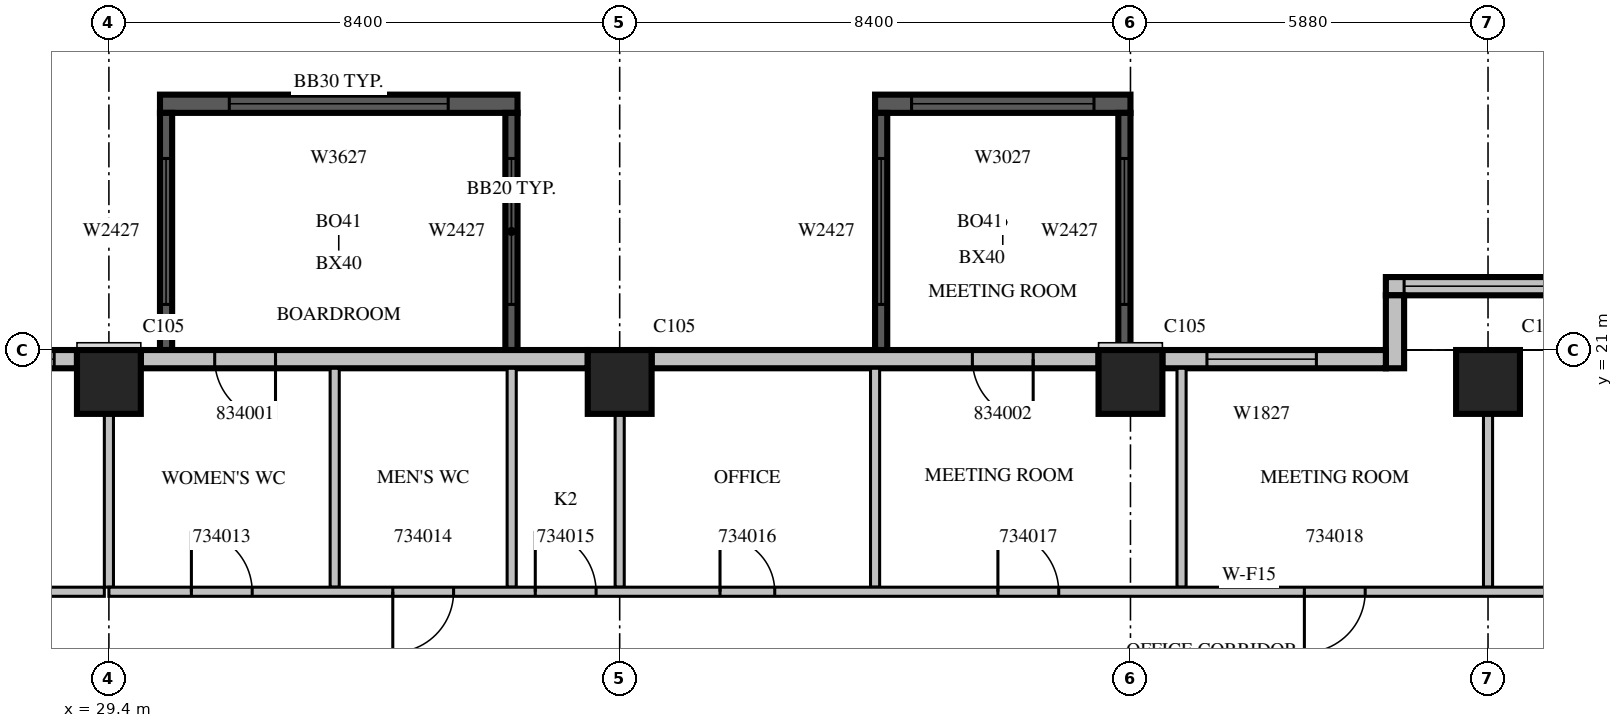
"""IFC4 building model, lengths in metres.
Left out: names, types, materials, properties, quantities, classifications, styles, units other than length and angle.
Written with IfcOpenShell. Run it as: python <this file> out.ifc"""

import sys

from ifc_helpers import new_model, si_unit, direction, frame, frame_2d, origin, origin_2d, place, context, subcontext, project, spatial, rectangle, extrude, source, transform, mapped, element, fill, save


model = new_model("IFC4")
c1 = context("Model", 3, precision=1e-05, world=origin(), true_north=direction((0.0, 1.0)))
c2 = subcontext(c1, "Body", "Model", "MODEL_VIEW")
j1 = project(units=[si_unit("LENGTHUNIT", "METRE"), si_unit("PLANEANGLEUNIT", "RADIAN")], contexts=[c1])
p1 = place(None, origin())
s1 = spatial("IfcSite", under=j1, at=p1, CompositionType="ELEMENT")
p2 = place(p1, origin())
s2 = spatial("IfcBuilding", under=s1, at=p2, CompositionType="ELEMENT")
p3 = place(p2, frame((0.0, 0.0, 153.9)))
s3 = spatial("IfcBuildingStorey", under=s2, at=p3, CompositionType="ELEMENT", Elevation=153.9)
m1 = source(origin(), c2, "Body", "SweptSolid", [
    extrude(rectangle(XDim=1.05, YDim=1.05, at=origin_2d()), origin(), (0.0, 0.0, 1.0), 4.2),
])
for number, where, z_axis, x_axis in (
    (1, (29.4, 20.475, 0.0), (0.0, 0.0, 1.0), (1.0, 0.0, 0.0)),
    (2, (37.8, 20.475, 0.0), (0.0, 0.0, 1.0), (1.0, 0.0, 0.0)),
    (3, (46.2, 20.475, 0.0), (0.0, 0.0, 1.0), (1.0, 0.0, 0.0)),
    (4, (52.08, 20.475, 0.0), (0.0, 0.0, 1.0), (1.0, 0.0, 0.0)),
):
    element("IfcColumn", number, at=place(p3, frame(where, z_axis=z_axis, x_axis=x_axis)), inside=s3, PredefinedType="COLUMN", context=c2, shape_type="MappedRepresentation", body=[
        mapped(m1, transform((0.0, 0.0, 0.0), scale=1.0)),
    ])
m2 = source(origin(), c2, "Body", "SweptSolid", [
    extrude(rectangle(XDim=5.88, YDim=0.3, at=frame_2d((2.94, 0.0))), origin(), (0.0, 0.0, 1.0), 3.8),
])
p4 = place(p3, frame((36.12, 25.05, 0.0), z_axis=(0.0, 0.0, 1.0), x_axis=(-1.0, 0.0, 0.0)))
e5 = element("IfcWall", 5, at=p4, inside=s3, PredefinedType="SOLIDWALL", context=c2, shape_type="MappedRepresentation", body=[
    mapped(m2, transform((0.0, 0.0, 0.0), scale=1.0)),
])
m3 = source(origin(), c2, "Body", "SweptSolid", [
    extrude(rectangle(XDim=3.6, YDim=2.7, at=frame_2d((1.8, 1.35))), frame((0.0, 0.16, 0.0), z_axis=(0.0, -1.0, 0.0), x_axis=(1.0, 0.0, 0.0)), (0.0, 0.0, 1.0), 0.32),
])
p5 = place(p4, frame((1.14, 0.0, 0.6)))
e6 = element("IfcOpeningElement", 6, at=p5, cuts=e5, PredefinedType="OPENING", context=c2, shape_type="MappedRepresentation", body=[
    mapped(m3, transform((0.0, 0.0, 0.0), scale=1.0)),
])
m4 = source(origin(), c2, "Body", "SweptSolid", [
    extrude(rectangle(XDim=3.9, YDim=0.2, at=frame_2d((1.95, 0.0))), origin(), (0.0, 0.0, 1.0), 3.8),
])
p6 = place(p3, frame((36.02, 21.0, 0.0), z_axis=(0.0, 0.0, 1.0), x_axis=(0.0, 1.0, 0.0)))
e7 = element("IfcWall", 7, at=p6, inside=s3, PredefinedType="SOLIDWALL", context=c2, shape_type="MappedRepresentation", body=[
    mapped(m4, transform((0.0, 0.0, 0.0), scale=1.0)),
])
m5 = source(origin(), c2, "Body", "SweptSolid", [
    extrude(rectangle(XDim=2.4, YDim=2.7, at=frame_2d((1.2, 1.35))), frame((0.0, 0.11, 0.0), z_axis=(0.0, -1.0, 0.0), x_axis=(1.0, 0.0, 0.0)), (0.0, 0.0, 1.0), 0.22),
])
p7 = place(p6, frame((0.75, 0.0, 0.6)))
e8 = element("IfcOpeningElement", 8, at=p7, cuts=e7, PredefinedType="OPENING", context=c2, shape_type="MappedRepresentation", body=[
    mapped(m5, transform((0.0, 0.0, 0.0), scale=1.0)),
])
p8 = place(p3, frame((30.34, 21.0, 0.0), z_axis=(0.0, 0.0, 1.0), x_axis=(0.0, 1.0, 0.0)))
e9 = element("IfcWall", 9, at=p8, inside=s3, PredefinedType="SOLIDWALL", context=c2, shape_type="MappedRepresentation", body=[
    mapped(m4, transform((0.0, 0.0, 0.0), scale=1.0)),
])
p9 = place(p8, frame((0.75, 0.0, 0.6)))
e10 = element("IfcOpeningElement", 10, at=p9, cuts=e9, PredefinedType="OPENING", context=c2, shape_type="MappedRepresentation", body=[
    mapped(m5, transform((0.0, 0.0, 0.0), scale=1.0)),
])
m6 = source(origin(), c2, "Body", "SweptSolid", [
    extrude(rectangle(XDim=4.2, YDim=0.3, at=frame_2d((2.1, 0.0))), origin(), (0.0, 0.0, 1.0), 3.8),
])
p10 = place(p3, frame((46.2, 25.05, 0.0), z_axis=(0.0, 0.0, 1.0), x_axis=(-1.0, 0.0, 0.0)))
e11 = element("IfcWall", 11, at=p10, inside=s3, PredefinedType="SOLIDWALL", context=c2, shape_type="MappedRepresentation", body=[
    mapped(m6, transform((0.0, 0.0, 0.0), scale=1.0)),
])
m7 = source(origin(), c2, "Body", "SweptSolid", [
    extrude(rectangle(XDim=3.0, YDim=2.7, at=frame_2d((1.5, 1.35))), frame((0.0, 0.16, 0.0), z_axis=(0.0, -1.0, 0.0), x_axis=(1.0, 0.0, 0.0)), (0.0, 0.0, 1.0), 0.32),
])
p11 = place(p10, frame((0.6, 0.0, 0.6)))
e12 = element("IfcOpeningElement", 12, at=p11, cuts=e11, PredefinedType="OPENING", context=c2, shape_type="MappedRepresentation", body=[
    mapped(m7, transform((0.0, 0.0, 0.0), scale=1.0)),
])
p12 = place(p3, frame((46.1, 21.0, 0.0), z_axis=(0.0, 0.0, 1.0), x_axis=(0.0, 1.0, 0.0)))
e13 = element("IfcWall", 13, at=p12, inside=s3, PredefinedType="SOLIDWALL", context=c2, shape_type="MappedRepresentation", body=[
    mapped(m4, transform((0.0, 0.0, 0.0), scale=1.0)),
])
p13 = place(p12, frame((0.75, 0.0, 0.6)))
e14 = element("IfcOpeningElement", 14, at=p13, cuts=e13, PredefinedType="OPENING", context=c2, shape_type="MappedRepresentation", body=[
    mapped(m5, transform((0.0, 0.0, 0.0), scale=1.0)),
])
p14 = place(p3, frame((42.1, 21.0, 0.0), z_axis=(0.0, 0.0, 1.0), x_axis=(0.0, 1.0, 0.0)))
e15 = element("IfcWall", 15, at=p14, inside=s3, PredefinedType="SOLIDWALL", context=c2, shape_type="MappedRepresentation", body=[
    mapped(m4, transform((0.0, 0.0, 0.0), scale=1.0)),
])
p15 = place(p14, frame((0.75, 0.0, 0.6)))
e16 = element("IfcOpeningElement", 16, at=p15, cuts=e15, PredefinedType="OPENING", context=c2, shape_type="MappedRepresentation", body=[
    mapped(m5, transform((0.0, 0.0, 0.0), scale=1.0)),
])
p16 = place(p3, frame((63.0, 22.05, 0.0), z_axis=(0.0, 0.0, 1.0), x_axis=(-1.0, 0.0, 0.0)))
e17 = element("IfcWall", 17, at=p16, inside=s3, PredefinedType="STANDARD", context=c2, shape_type="SweptSolid", body=[
    extrude(rectangle(XDim=12.6, YDim=0.3, at=frame_2d((6.3, 0.0))), origin(), (0.0, 0.0, 1.0), 3.8),
])
p17 = place(p16, frame((0.3, 0.0, 0.6)))
e18 = element("IfcOpeningElement", 18, at=p17, cuts=e17, PredefinedType="OPENING", context=c2, shape_type="MappedRepresentation", body=[
    mapped(m3, transform((0.0, 0.0, 0.0), scale=1.0)),
])
p18 = place(p16, frame((4.5, 0.0, 0.6)))
e19 = element("IfcOpeningElement", 19, at=p18, cuts=e17, PredefinedType="OPENING", context=c2, shape_type="MappedRepresentation", body=[
    mapped(m3, transform((0.0, 0.0, 0.0), scale=1.0)),
])
p19 = place(p16, frame((8.7, 0.0, 0.6)))
e20 = element("IfcOpeningElement", 20, at=p19, cuts=e17, PredefinedType="OPENING", context=c2, shape_type="MappedRepresentation", body=[
    mapped(m3, transform((0.0, 0.0, 0.0), scale=1.0)),
])
m8 = source(origin(), c2, "Body", "SweptSolid", [
    extrude(rectangle(XDim=1.2, YDim=0.3, at=frame_2d((0.6, 0.0))), origin(), (0.0, 0.0, 1.0), 3.8),
])
p20 = place(p3, frame((50.55, 20.7, 0.0), z_axis=(0.0, 0.0, 1.0), x_axis=(0.0, 1.0, 0.0)))
e21 = element("IfcWall", 21, at=p20, inside=s3, PredefinedType="STANDARD", context=c2, shape_type="MappedRepresentation", body=[
    mapped(m8, transform((0.0, 0.0, 0.0), scale=1.0)),
])
m9 = source(origin(), c2, "Body", "SweptSolid", [
    extrude(rectangle(XDim=3.675, YDim=0.3, at=frame_2d((1.837, 0.0))), origin(), (0.0, 0.0, 1.0), 3.8),
])
p21 = place(p3, frame((50.4, 20.85, 0.0), z_axis=(0.0, 0.0, 1.0), x_axis=(-1.0, 0.0, 0.0)))
e22 = element("IfcWall", 22, at=p21, inside=s3, PredefinedType="STANDARD", context=c2, shape_type="MappedRepresentation", body=[
    mapped(m9, transform((0.0, 0.0, 0.0), scale=1.0)),
])
m10 = source(origin(), c2, "Body", "SweptSolid", [
    extrude(rectangle(XDim=1.8, YDim=2.7, at=frame_2d((0.9, 1.35))), frame((0.0, 0.16, 0.0), z_axis=(0.0, -1.0, 0.0), x_axis=(1.0, 0.0, 0.0)), (0.0, 0.0, 1.0), 0.32),
])
p22 = place(p21, frame((1.143, 0.0, 0.6)))
e23 = element("IfcOpeningElement", 23, at=p22, cuts=e22, PredefinedType="OPENING", context=c2, shape_type="MappedRepresentation", body=[
    mapped(m10, transform((0.0, 0.0, 0.0), scale=1.0)),
])
m11 = source(origin(), c2, "Body", "SweptSolid", [
    extrude(rectangle(XDim=7.35, YDim=0.3, at=frame_2d((3.675, 0.0))), origin(), (0.0, 0.0, 1.0), 3.8),
])
p23 = place(p3, frame((45.675, 20.85, 0.0), z_axis=(0.0, 0.0, 1.0), x_axis=(-1.0, 0.0, 0.0)))
e24 = element("IfcWall", 24, at=p23, inside=s3, PredefinedType="STANDARD", context=c2, shape_type="MappedRepresentation", body=[
    mapped(m11, transform((0.0, 0.0, 0.0), scale=1.0)),
])
m12 = source(origin(), c2, "Body", "SweptSolid", [
    extrude(rectangle(XDim=1.0, YDim=2.1, at=frame_2d((0.5, 1.05))), frame((0.0, 0.16, 0.0), z_axis=(0.0, -1.0, 0.0), x_axis=(1.0, 0.0, 0.0)), (0.0, 0.0, 1.0), 0.32),
])
p24 = place(p23, frame((1.075, 0.0, 0.0)))
e25 = element("IfcOpeningElement", 25, at=p24, cuts=e24, PredefinedType="OPENING", context=c2, shape_type="MappedRepresentation", body=[
    mapped(m12, transform((0.0, 0.0, 0.0), scale=1.0)),
])
p25 = place(p3, frame((37.275, 20.85, 0.0), z_axis=(0.0, 0.0, 1.0), x_axis=(-1.0, 0.0, 0.0)))
e26 = element("IfcWall", 26, at=p25, inside=s3, PredefinedType="STANDARD", context=c2, shape_type="MappedRepresentation", body=[
    mapped(m11, transform((0.0, 0.0, 0.0), scale=1.0)),
])
p26 = place(p25, frame((5.135, 0.0, 0.0)))
e27 = element("IfcOpeningElement", 27, at=p26, cuts=e26, PredefinedType="OPENING", context=c2, shape_type="MappedRepresentation", body=[
    mapped(m12, transform((0.0, 0.0, 0.0), scale=1.0)),
])
m13 = source(origin(), c2, "Body", "SweptSolid", [
    extrude(rectangle(XDim=6.875, YDim=0.3, at=frame_2d((3.438, 0.0))), origin(), (0.0, 0.0, 1.0), 3.8),
])
p27 = place(p3, frame((28.875, 20.85, 0.0), z_axis=(0.0, 0.0, 1.0), x_axis=(-1.0, 0.0, 0.0)))
e28 = element("IfcWall", 28, at=p27, inside=s3, PredefinedType="STANDARD", context=c2, shape_type="MappedRepresentation", body=[
    mapped(m13, transform((0.0, 0.0, 0.0), scale=1.0)),
])
m14 = source(origin(), c2, "Body", "SweptSolid", [
    extrude(rectangle(XDim=2.4, YDim=2.7, at=frame_2d((1.2, 1.35))), frame((0.0, 0.16, 0.0), z_axis=(0.0, -1.0, 0.0), x_axis=(1.0, 0.0, 0.0)), (0.0, 0.0, 1.0), 0.32),
])
p28 = place(p27, frame((0.375, 0.0, 0.6)))
e29 = element("IfcOpeningElement", 29, at=p28, cuts=e28, PredefinedType="OPENING", context=c2, shape_type="MappedRepresentation", body=[
    mapped(m14, transform((0.0, 0.0, 0.0), scale=1.0)),
])
m15 = source(origin(), c2, "Body", "SweptSolid", [
    extrude(rectangle(XDim=5.35, YDim=0.15, at=frame_2d((2.675, 0.0))), origin(), (0.0, 0.0, 1.0), 3.8),
])
p29 = place(p3, frame((23.975, 17.025, 0.0), z_axis=(0.0, 0.0, 1.0), x_axis=(1.0, 0.0, 0.0)))
e30 = element("IfcWall", 30, at=p29, inside=s3, PredefinedType="PARTITIONING", context=c2, shape_type="MappedRepresentation", body=[
    mapped(m15, transform((0.0, 0.0, 0.0), scale=1.0)),
])
m16 = source(origin(), c2, "Body", "SweptSolid", [
    extrude(rectangle(XDim=2.851, YDim=0.15, at=frame_2d((1.425, 0.0))), origin(), (0.0, 0.0, 1.0), 3.8),
])
p30 = place(p3, frame((29.4, 17.1, 0.0), z_axis=(0.0, 0.0, 1.0), x_axis=(0.0, 1.0, 0.0)))
e31 = element("IfcWall", 31, at=p30, inside=s3, PredefinedType="PARTITIONING", context=c2, shape_type="MappedRepresentation", body=[
    mapped(m16, transform((0.0, 0.0, 0.0), scale=1.0)),
])
m17 = source(origin(), c2, "Body", "SweptSolid", [
    extrude(rectangle(XDim=3.6, YDim=0.15, at=frame_2d((1.8, 0.0))), origin(), (0.0, 0.0, 1.0), 3.8),
])
for number, where, z_axis, x_axis in (
    (32, (33.113, 20.7, 0.0), (0.0, 0.0, 1.0), (0.0, -1.0, 0.0)),
    (33, (36.024, 20.7, 0.0), (0.0, 0.0, 1.0), (0.0, -1.0, 0.0)),
    (34, (47.04, 20.7, 0.0), (0.0, 0.0, 1.0), (0.0, -1.0, 0.0)),
):
    element("IfcWall", number, at=place(p3, frame(where, z_axis=z_axis, x_axis=x_axis)), inside=s3, PredefinedType="PARTITIONING", context=c2, shape_type="MappedRepresentation", body=[
        mapped(m17, transform((0.0, 0.0, 0.0), scale=1.0)),
    ])
p31 = place(p3, frame((37.8, 17.1, 0.0), z_axis=(0.0, 0.0, 1.0), x_axis=(0.0, 1.0, 0.0)))
e35 = element("IfcWall", 35, at=p31, inside=s3, PredefinedType="PARTITIONING", context=c2, shape_type="MappedRepresentation", body=[
    mapped(m16, transform((0.0, 0.0, 0.0), scale=1.0)),
])
p32 = place(p3, frame((42.0, 17.1, 0.0), z_axis=(0.0, 0.0, 1.0), x_axis=(0.0, 1.0, 0.0)))
e36 = element("IfcWall", 36, at=p32, inside=s3, PredefinedType="PARTITIONING", context=c2, shape_type="MappedRepresentation", body=[
    mapped(m17, transform((0.0, 0.0, 0.0), scale=1.0)),
])
p33 = place(p3, frame((52.08, 17.1, 0.0), z_axis=(0.0, 0.0, 1.0), x_axis=(0.0, 1.0, 0.0)))
e37 = element("IfcWall", 37, at=p33, inside=s3, PredefinedType="PARTITIONING", context=c2, shape_type="MappedRepresentation", body=[
    mapped(m16, transform((0.0, 0.0, 0.0), scale=1.0)),
])
m18 = source(origin(), c2, "Body", "SweptSolid", [
    extrude(rectangle(XDim=37.5, YDim=0.15, at=frame_2d((18.75, 0.0))), origin(), (0.0, 0.0, 1.0), 3.8),
])
p34 = place(p3, frame((29.4, 17.025, 0.0), z_axis=(0.0, 0.0, 1.0), x_axis=(1.0, 0.0, 0.0)))
e38 = element("IfcWall", 38, at=p34, inside=s3, PredefinedType="PARTITIONING", context=c2, shape_type="MappedRepresentation", body=[
    mapped(m18, transform((0.0, 0.0, 0.0), scale=1.0)),
])
m19 = source(origin(), c2, "Body", "SweptSolid", [
    extrude(rectangle(XDim=1.0, YDim=2.1, at=frame_2d((0.5, 1.05))), frame((0.0, 0.085, 0.0), z_axis=(0.0, -1.0, 0.0), x_axis=(1.0, 0.0, 0.0)), (0.0, 0.0, 1.0), 0.17),
])
p35 = place(p34, frame((1.357, 0.0, 0.0)))
e39 = element("IfcOpeningElement", 39, at=p35, cuts=e38, PredefinedType="OPENING", context=c2, shape_type="MappedRepresentation", body=[
    mapped(m19, transform((0.0, 0.0, 0.0), scale=1.0)),
])
p36 = place(p34, frame((4.669, 0.0, 0.0)))
e40 = element("IfcOpeningElement", 40, at=p36, cuts=e38, PredefinedType="OPENING", context=c2, shape_type="MappedRepresentation", body=[
    mapped(m19, transform((0.0, 0.0, 0.0), scale=1.0)),
])
p37 = place(p34, frame((7.012, 0.0, 0.0)))
e41 = element("IfcOpeningElement", 41, at=p37, cuts=e38, PredefinedType="OPENING", context=c2, shape_type="MappedRepresentation", body=[
    mapped(m19, transform((0.0, 0.0, 0.0), scale=1.0)),
])
m20 = source(origin(), c2, "Body", "SweptSolid", [
    extrude(rectangle(XDim=0.9, YDim=2.1, at=frame_2d((0.45, 1.05))), frame((0.0, 0.085, 0.0), z_axis=(0.0, -1.0, 0.0), x_axis=(1.0, 0.0, 0.0)), (0.0, 0.0, 1.0), 0.17),
])
p38 = place(p34, frame((10.05, 0.0, 0.0)))
e42 = element("IfcOpeningElement", 42, at=p38, cuts=e38, PredefinedType="OPENING", context=c2, shape_type="MappedRepresentation", body=[
    mapped(m20, transform((0.0, 0.0, 0.0), scale=1.0)),
])
p39 = place(p34, frame((14.62, 0.0, 0.0)))
e43 = element("IfcOpeningElement", 43, at=p39, cuts=e38, PredefinedType="OPENING", context=c2, shape_type="MappedRepresentation", body=[
    mapped(m19, transform((0.0, 0.0, 0.0), scale=1.0)),
])
p40 = place(p34, frame((19.66, 0.0, 0.0)))
e44 = element("IfcOpeningElement", 44, at=p40, cuts=e38, PredefinedType="OPENING", context=c2, shape_type="MappedRepresentation", body=[
    mapped(m19, transform((0.0, 0.0, 0.0), scale=1.0)),
])
m21 = source(origin(), c2, "Body", "SweptSolid", [
    extrude(rectangle(XDim=1.2, YDim=2.1, at=frame_2d((0.6, 1.05))), frame((0.0, 0.085, 0.0), z_axis=(0.0, -1.0, 0.0), x_axis=(1.0, 0.0, 0.0)), (0.0, 0.0, 1.0), 0.17),
])
p41 = place(p34, frame((25.804, 0.0, 0.0)))
e45 = element("IfcOpeningElement", 45, at=p41, cuts=e38, PredefinedType="OPENING", context=c2, shape_type="MappedRepresentation", body=[
    mapped(m21, transform((0.0, 0.0, 0.0), scale=1.0)),
])
p42 = place(p34, frame((33.251, 0.0, 0.0)))
e46 = element("IfcOpeningElement", 46, at=p42, cuts=e38, PredefinedType="OPENING", context=c2, shape_type="MappedRepresentation", body=[
    mapped(m21, transform((0.0, 0.0, 0.0), scale=1.0)),
])
m22 = source(origin(), c2, "Body", "SweptSolid", [
    extrude(rectangle(XDim=3.6, YDim=2.7, at=frame_2d((1.8, 1.35))), frame((0.0, 0.03, 0.0), z_axis=(0.0, -1.0, 0.0), x_axis=(1.0, 0.0, 0.0)), (0.0, 0.0, 1.0), 0.06),
])
p43 = place(p5, origin())
e47 = element("IfcWindow", 47, at=p43, inside=s3, PartitioningType="SINGLE_PANEL", PredefinedType="WINDOW", context=c2, shape_type="MappedRepresentation", body=[
    mapped(m22, transform((0.0, 0.0, 0.0), scale=1.0)),
])
fill(e6, e47)
m23 = source(origin(), c2, "Body", "SweptSolid", [
    extrude(rectangle(XDim=2.4, YDim=2.7, at=frame_2d((1.2, 1.35))), frame((0.0, 0.03, 0.0), z_axis=(0.0, -1.0, 0.0), x_axis=(1.0, 0.0, 0.0)), (0.0, 0.0, 1.0), 0.06),
])
p44 = place(p7, origin())
e48 = element("IfcWindow", 48, at=p44, inside=s3, PartitioningType="SINGLE_PANEL", PredefinedType="WINDOW", context=c2, shape_type="MappedRepresentation", body=[
    mapped(m23, transform((0.0, 0.0, 0.0), scale=1.0)),
])
fill(e8, e48)
p45 = place(p9, origin())
e49 = element("IfcWindow", 49, at=p45, inside=s3, PartitioningType="SINGLE_PANEL", PredefinedType="WINDOW", context=c2, shape_type="MappedRepresentation", body=[
    mapped(m23, transform((0.0, 0.0, 0.0), scale=1.0)),
])
fill(e10, e49)
m24 = source(origin(), c2, "Body", "SweptSolid", [
    extrude(rectangle(XDim=3.0, YDim=2.7, at=frame_2d((1.5, 1.35))), frame((0.0, 0.03, 0.0), z_axis=(0.0, -1.0, 0.0), x_axis=(1.0, 0.0, 0.0)), (0.0, 0.0, 1.0), 0.06),
])
p46 = place(p11, origin())
e50 = element("IfcWindow", 50, at=p46, inside=s3, PartitioningType="SINGLE_PANEL", PredefinedType="WINDOW", context=c2, shape_type="MappedRepresentation", body=[
    mapped(m24, transform((0.0, 0.0, 0.0), scale=1.0)),
])
fill(e12, e50)
p47 = place(p13, origin())
e51 = element("IfcWindow", 51, at=p47, inside=s3, PartitioningType="SINGLE_PANEL", PredefinedType="WINDOW", context=c2, shape_type="MappedRepresentation", body=[
    mapped(m23, transform((0.0, 0.0, 0.0), scale=1.0)),
])
fill(e14, e51)
p48 = place(p15, origin())
e52 = element("IfcWindow", 52, at=p48, inside=s3, PartitioningType="SINGLE_PANEL", PredefinedType="WINDOW", context=c2, shape_type="MappedRepresentation", body=[
    mapped(m23, transform((0.0, 0.0, 0.0), scale=1.0)),
])
fill(e16, e52)
p49 = place(p19, origin())
e53 = element("IfcWindow", 53, at=p49, inside=s3, PartitioningType="SINGLE_PANEL", PredefinedType="WINDOW", context=c2, shape_type="MappedRepresentation", body=[
    mapped(m22, transform((0.0, 0.0, 0.0), scale=1.0)),
])
fill(e20, e53)
m25 = source(origin(), c2, "Body", "SweptSolid", [
    extrude(rectangle(XDim=1.8, YDim=2.7, at=frame_2d((0.9, 1.35))), frame((0.0, 0.03, 0.0), z_axis=(0.0, -1.0, 0.0), x_axis=(1.0, 0.0, 0.0)), (0.0, 0.0, 1.0), 0.06),
])
p50 = place(p22, origin())
e54 = element("IfcWindow", 54, at=p50, inside=s3, PartitioningType="SINGLE_PANEL", PredefinedType="WINDOW", context=c2, shape_type="MappedRepresentation", body=[
    mapped(m25, transform((0.0, 0.0, 0.0), scale=1.0)),
])
fill(e23, e54)
p51 = place(p28, origin())
e55 = element("IfcWindow", 55, at=p51, inside=s3, PartitioningType="SINGLE_PANEL", PredefinedType="WINDOW", context=c2, shape_type="MappedRepresentation", body=[
    mapped(m23, transform((0.0, 0.0, 0.0), scale=1.0)),
])
fill(e29, e55)
m26 = source(origin(), c2, "Body", "SweptSolid", [
    extrude(rectangle(XDim=1.0, YDim=2.1, at=frame_2d((0.5, 1.05))), frame((0.0, 0.025, 0.0), z_axis=(0.0, -1.0, 0.0), x_axis=(1.0, 0.0, 0.0)), (0.0, 0.0, 1.0), 0.05),
])
p52 = place(p35, origin())
e56 = element("IfcDoor", 56, at=p52, inside=s3, OperationType="SINGLE_SWING_LEFT", PredefinedType="DOOR", context=c2, shape_type="MappedRepresentation", body=[
    mapped(m26, transform((0.0, 0.0, 0.0), scale=1.0)),
])
fill(e39, e56)
p53 = place(p36, origin())
e57 = element("IfcDoor", 57, at=p53, inside=s3, OperationType="SINGLE_SWING_RIGHT", PredefinedType="DOOR", context=c2, shape_type="MappedRepresentation", body=[
    mapped(m26, transform((0.0, 0.0, 0.0), scale=1.0)),
])
fill(e40, e57)
p54 = place(p37, origin())
e58 = element("IfcDoor", 58, at=p54, inside=s3, OperationType="SINGLE_SWING_LEFT", PredefinedType="DOOR", context=c2, shape_type="MappedRepresentation", body=[
    mapped(m26, transform((0.0, 0.0, 0.0), scale=1.0)),
])
fill(e41, e58)
m27 = source(origin(), c2, "Body", "SweptSolid", [
    extrude(rectangle(XDim=0.9, YDim=2.1, at=frame_2d((0.45, 1.05))), frame((0.0, 0.025, 0.0), z_axis=(0.0, -1.0, 0.0), x_axis=(1.0, 0.0, 0.0)), (0.0, 0.0, 1.0), 0.05),
])
p55 = place(p38, origin())
e59 = element("IfcDoor", 59, at=p55, inside=s3, OperationType="SINGLE_SWING_LEFT", PredefinedType="DOOR", context=c2, shape_type="MappedRepresentation", body=[
    mapped(m27, transform((0.0, 0.0, 0.0), scale=1.0)),
])
fill(e42, e59)
p56 = place(p39, origin())
e60 = element("IfcDoor", 60, at=p56, inside=s3, OperationType="SINGLE_SWING_LEFT", PredefinedType="DOOR", context=c2, shape_type="MappedRepresentation", body=[
    mapped(m26, transform((0.0, 0.0, 0.0), scale=1.0)),
])
fill(e43, e60)
p57 = place(p40, origin())
e61 = element("IfcDoor", 61, at=p57, inside=s3, OperationType="SINGLE_SWING_RIGHT", PredefinedType="DOOR", context=c2, shape_type="MappedRepresentation", body=[
    mapped(m26, transform((0.0, 0.0, 0.0), scale=1.0)),
])
fill(e44, e61)
p58 = place(p26, origin())
e62 = element("IfcDoor", 62, at=p58, inside=s3, OperationType="SINGLE_SWING_LEFT", PredefinedType="DOOR", context=c2, shape_type="MappedRepresentation", body=[
    mapped(m26, transform((0.0, 0.0, 0.0), scale=1.0)),
])
fill(e27, e62)
p59 = place(p24, origin())
e63 = element("IfcDoor", 63, at=p59, inside=s3, OperationType="SINGLE_SWING_LEFT", PredefinedType="DOOR", context=c2, shape_type="MappedRepresentation", body=[
    mapped(m26, transform((0.0, 0.0, 0.0), scale=1.0)),
])
fill(e25, e63)
save(model, sys.argv[1])
